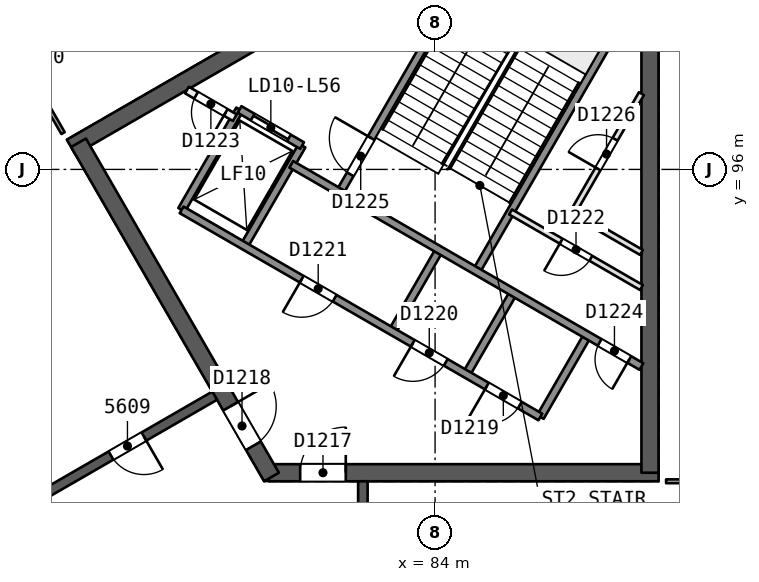
"""IFC4 building model, lengths in metres.
Left out: names, types, materials, properties, quantities, classifications, styles, units other than length and angle.
Written with IfcOpenShell. Run it as: python <this file> out.ifc"""

import sys

from ifc_helpers import new_model, si_unit, direction, frame, frame_2d, origin, place, context, subcontext, project, spatial, rectangle, extrude, element, fill, save


model = new_model("IFC4")
c1 = context("Model", 3, precision=1e-05, world=origin(), true_north=direction((0.0, 1.0)))
c2 = subcontext(c1, "Body", "Model", "MODEL_VIEW")
j1 = project(units=[si_unit("LENGTHUNIT", "METRE"), si_unit("PLANEANGLEUNIT", "RADIAN")], contexts=[c1])
p1 = place(None, origin())
s1 = spatial("IfcSite", under=j1, at=p1, CompositionType="ELEMENT")
p2 = place(p1, origin())
s2 = spatial("IfcBuilding", under=s1, at=p2, CompositionType="ELEMENT")
p3 = place(p2, frame((0.0, 0.0, 228.0)))
s3 = spatial("IfcBuildingStorey", under=s2, at=p3, CompositionType="ELEMENT", Elevation=228.0)
p4 = place(p3, frame((79.63, 88.019, 0.0), z_axis=(0.0, 0.0, 1.0), x_axis=(1.0, 0.0, 0.0)))
e1 = element("IfcWall", 1, at=p4, inside=s3, PredefinedType="SHEAR", context=c2, shape_type="SweptSolid", body=[
    extrude(rectangle(XDim=10.25, YDim=0.45, at=frame_2d((5.125, 0.0))), origin(), (0.0, 0.0, 1.0), 3.7),
])
p5 = place(p4, frame((0.82, 0.0, 0.0)))
e2 = element("IfcOpeningElement", 2, at=p5, cuts=e1, PredefinedType="OPENING", context=c2, shape_type="SweptSolid", body=[
    extrude(rectangle(XDim=1.2, YDim=2.1, at=frame_2d((0.6, 1.05))), frame((0.0, 0.235, 0.0), z_axis=(0.0, -1.0, 0.0), x_axis=(1.0, 0.0, 0.0)), (0.0, 0.0, 1.0), 0.471),
])
p6 = place(p3, frame((89.655, 88.019, 0.0), z_axis=(0.0, 0.0, 1.0), x_axis=(0.0, 1.0, 0.0)))
e3 = element("IfcWall", 3, at=p6, inside=s3, PredefinedType="SHEAR", context=c2, shape_type="SweptSolid", body=[
    extrude(rectangle(XDim=14.108, YDim=0.45, at=frame_2d((7.054, 0.0))), origin(), (0.0, 0.0, 1.0), 3.7),
])
p7 = place(p3, frame((86.723, 103.69, 0.0), z_axis=(0.0, 0.0, 1.0), x_axis=(-0.866022713978, -0.500004658852, 0.0)))
e4 = element("IfcWall", 4, at=p7, inside=s3, PredefinedType="SHEAR", context=c2, shape_type="SweptSolid", body=[
    extrude(rectangle(XDim=14.203, YDim=0.45, at=frame_2d((7.102, 0.0))), origin(), (0.0, 0.0, 1.0), 3.7),
])
p8 = place(p3, frame((74.617, 96.701, 0.0), z_axis=(0.0, 0.0, 1.0), x_axis=(0.499994385119, -0.866028645513, 0.0)))
e5 = element("IfcWall", 5, at=p8, inside=s3, PredefinedType="SHEAR", context=c2, shape_type="SweptSolid", body=[
    extrude(rectangle(XDim=10.155, YDim=0.45, at=frame_2d((5.077, 0.0))), origin(), (0.0, 0.0, 1.0), 3.7),
])
p9 = place(p8, frame((8.005, 0.0, 0.0)))
e6 = element("IfcOpeningElement", 6, at=p9, cuts=e5, PredefinedType="OPENING", context=c2, shape_type="SweptSolid", body=[
    extrude(rectangle(XDim=1.2, YDim=2.1, at=frame_2d((0.6, 1.05))), frame((0.0, 0.235, 0.0), z_axis=(0.0, -1.0, 0.0), x_axis=(1.0, 0.0, 0.0)), (0.0, 0.0, 1.0), 0.471),
])
p10 = place(p3, frame((82.1, 72.206, 0.0), z_axis=(0.0, 0.0, 1.0), x_axis=(0.0, 1.0, 0.0)))
e7 = element("IfcWall", 7, at=p10, inside=s3, PredefinedType="SHEAR", context=c2, shape_type="SweptSolid", body=[
    extrude(rectangle(XDim=15.588, YDim=0.25, at=frame_2d((7.794, 0.0))), origin(), (0.0, 0.0, 1.0), 3.3),
])
p11 = place(p10, frame((2.15, 0.0, 0.0)))
e8 = element("IfcOpeningElement", 8, at=p11, cuts=e7, PredefinedType="OPENING", context=c2, shape_type="SweptSolid", body=[
    extrude(rectangle(XDim=1.0, YDim=2.1, at=frame_2d((0.5, 1.05))), frame((0.0, 0.135, 0.0), z_axis=(0.0, -1.0, 0.0), x_axis=(1.0, 0.0, 0.0)), (0.0, 0.0, 1.0), 0.271),
])
p12 = place(p10, frame((8.75, 0.0, 0.0)))
e9 = element("IfcOpeningElement", 9, at=p12, cuts=e7, PredefinedType="OPENING", context=c2, shape_type="SweptSolid", body=[
    extrude(rectangle(XDim=1.0, YDim=2.1, at=frame_2d((0.5, 1.05))), frame((0.0, 0.135, 0.0), z_axis=(0.0, -1.0, 0.0), x_axis=(1.0, 0.0, 0.0)), (0.0, 0.0, 1.0), 0.271),
])
p13 = place(p10, frame((12.594, 0.0, 0.0)))
e10 = element("IfcOpeningElement", 10, at=p13, cuts=e7, PredefinedType="OPENING", context=c2, shape_type="SweptSolid", body=[
    extrude(rectangle(XDim=1.0, YDim=2.1, at=frame_2d((0.5, 1.05))), frame((0.0, 0.135, 0.0), z_axis=(0.0, -1.0, 0.0), x_axis=(1.0, 0.0, 0.0)), (0.0, 0.0, 1.0), 0.271),
])
p14 = place(p3, frame((78.2, 90.046, 0.0), z_axis=(0.0, 0.0, 1.0), x_axis=(-0.866026492143, -0.499998114903, 0.0)))
e11 = element("IfcWall", 11, at=p14, inside=s3, PredefinedType="SHEAR", context=c2, shape_type="SweptSolid", body=[
    extrude(rectangle(XDim=15.588, YDim=0.25, at=frame_2d((7.794, 0.0))), origin(), (0.0, 0.0, 1.0), 3.3),
])
p15 = place(p14, frame((2.15, 0.0, 0.0)))
e12 = element("IfcOpeningElement", 12, at=p15, cuts=e11, PredefinedType="OPENING", context=c2, shape_type="SweptSolid", body=[
    extrude(rectangle(XDim=1.0, YDim=2.1, at=frame_2d((0.5, 1.05))), frame((0.0, 0.135, 0.0), z_axis=(0.0, -1.0, 0.0), x_axis=(1.0, 0.0, 0.0)), (0.0, 0.0, 1.0), 0.271),
])
p16 = place(p14, frame((8.538, 0.0, 0.0)))
e13 = element("IfcOpeningElement", 13, at=p16, cuts=e11, PredefinedType="OPENING", context=c2, shape_type="SweptSolid", body=[
    extrude(rectangle(XDim=1.1, YDim=2.1, at=frame_2d((0.55, 1.05))), frame((0.0, 0.135, 0.0), z_axis=(0.0, -1.0, 0.0), x_axis=(1.0, 0.0, 0.0)), (0.0, 0.0, 1.0), 0.271),
])
p17 = place(p14, frame((12.282, 0.0, 0.0)))
e14 = element("IfcOpeningElement", 14, at=p17, cuts=e11, PredefinedType="OPENING", context=c2, shape_type="SweptSolid", body=[
    extrude(rectangle(XDim=1.0, YDim=2.1, at=frame_2d((0.5, 1.05))), frame((0.0, 0.135, 0.0), z_axis=(0.0, -1.0, 0.0), x_axis=(1.0, 0.0, 0.0)), (0.0, 0.0, 1.0), 0.271),
])
p18 = place(p3, frame((92.354, 87.794, 0.0), z_axis=(0.0, 0.0, 1.0), x_axis=(-1.0, 0.0, 0.0)))
e15 = element("IfcWall", 15, at=p18, inside=s3, PredefinedType="PARTITIONING", context=c2, shape_type="SweptSolid", body=[
    extrude(rectangle(XDim=2.274, YDim=0.1, at=frame_2d((1.137, 0.0))), origin(), (0.0, 0.0, 1.0), 3.3),
])
p19 = place(p18, frame((0.687, 0.0, 0.0)))
e16 = element("IfcOpeningElement", 16, at=p19, cuts=e15, PredefinedType="OPENING", context=c2, shape_type="SweptSolid", body=[
    extrude(rectangle(XDim=0.9, YDim=2.1, at=frame_2d((0.45, 1.05))), frame((0.0, 0.061, 0.0), z_axis=(0.0, -1.0, 0.0), x_axis=(1.0, 0.0, 0.0)), (0.0, 0.0, 1.0), 0.121),
])
p20 = place(p3, frame((74.21, 96.956, 0.0), z_axis=(0.0, 0.0, 1.0), x_axis=(-0.499948534732, 0.866055115232, 0.0)))
e17 = element("IfcWall", 17, at=p20, inside=s3, PredefinedType="PARTITIONING", context=c2, shape_type="SweptSolid", body=[
    extrude(rectangle(XDim=2.275, YDim=0.1, at=frame_2d((1.137, 0.0))), origin(), (0.0, 0.0, 1.0), 3.3),
])
p21 = place(p20, frame((0.687, 0.0, 0.0)))
e18 = element("IfcOpeningElement", 18, at=p21, cuts=e17, PredefinedType="OPENING", context=c2, shape_type="SweptSolid", body=[
    extrude(rectangle(XDim=0.9, YDim=2.1, at=frame_2d((0.45, 1.05))), frame((0.0, 0.061, 0.0), z_axis=(0.0, -1.0, 0.0), x_axis=(1.0, 0.0, 0.0)), (0.0, 0.0, 1.0), 0.121),
])
p22 = place(p3, frame((44.454, 82.574, 0.0), z_axis=(0.0, 0.0, 1.0), x_axis=(0.86602387423, 0.500002649256, 0.0)))
e19 = element("IfcWall", 19, at=p22, inside=s3, PredefinedType="SOLIDWALL", context=c2, shape_type="SweptSolid", body=[
    extrude(rectangle(XDim=50.333, YDim=0.3, at=frame_2d((25.167, 0.0))), origin(), (0.0, 0.0, 1.0), 3.3),
])
p23 = place(p22, frame((24.122, 0.0, 0.0)))
e20 = element("IfcOpeningElement", 20, at=p23, cuts=e19, PredefinedType="OPENING", context=c2, shape_type="SweptSolid", body=[
    extrude(rectangle(XDim=2.4, YDim=2.4, at=frame_2d((1.2, 1.2))), frame((0.0, 0.161, 0.0), z_axis=(0.0, -1.0, 0.0), x_axis=(1.0, 0.0, 0.0)), (0.0, 0.0, 1.0), 0.321),
])
p24 = place(p22, frame((29.111, 0.0, 0.0)))
e21 = element("IfcOpeningElement", 21, at=p24, cuts=e19, PredefinedType="OPENING", context=c2, shape_type="SweptSolid", body=[
    extrude(rectangle(XDim=2.4, YDim=2.4, at=frame_2d((1.2, 1.2))), frame((0.0, 0.161, 0.0), z_axis=(0.0, -1.0, 0.0), x_axis=(1.0, 0.0, 0.0)), (0.0, 0.0, 1.0), 0.321),
])
p25 = place(p22, frame((39.164, 0.0, 0.0)))
e22 = element("IfcOpeningElement", 22, at=p25, cuts=e19, PredefinedType="OPENING", context=c2, shape_type="SweptSolid", body=[
    extrude(rectangle(XDim=2.4, YDim=2.4, at=frame_2d((1.2, 1.2))), frame((0.0, 0.161, 0.0), z_axis=(0.0, -1.0, 0.0), x_axis=(1.0, 0.0, 0.0)), (0.0, 0.0, 1.0), 0.321),
])
p26 = place(p22, frame((18.978, 0.0, 0.0)))
e23 = element("IfcOpeningElement", 23, at=p26, cuts=e19, PredefinedType="OPENING", context=c2, shape_type="SweptSolid", body=[
    extrude(rectangle(XDim=2.4, YDim=2.4, at=frame_2d((1.2, 1.2))), frame((0.0, 0.161, 0.0), z_axis=(0.0, -1.0, 0.0), x_axis=(1.0, 0.0, 0.0)), (0.0, 0.0, 1.0), 0.321),
])
p27 = place(p22, frame((8.763, 0.0, 0.0)))
e24 = element("IfcOpeningElement", 24, at=p27, cuts=e19, PredefinedType="OPENING", context=c2, shape_type="SweptSolid", body=[
    extrude(rectangle(XDim=2.4, YDim=2.4, at=frame_2d((1.2, 1.2))), frame((0.0, 0.161, 0.0), z_axis=(0.0, -1.0, 0.0), x_axis=(1.0, 0.0, 0.0)), (0.0, 0.0, 1.0), 0.321),
])
p28 = place(p3, frame((86.77, 89.486, 0.0), z_axis=(0.0, 0.0, 1.0), x_axis=(0.499961042966, 0.86604789447, 0.0)))
e25 = element("IfcWall", 25, at=p28, inside=s3, PredefinedType="SOLIDWALL", context=c2, shape_type="SweptSolid", body=[
    extrude(rectangle(XDim=2.48, YDim=0.2, at=frame_2d((1.24, 0.0))), origin(), (0.0, 0.0, 1.0), 3.3),
])
p29 = place(p3, frame((87.621, 94.86, 0.0), z_axis=(0.0, 0.0, 1.0), x_axis=(0.499993116331, 0.866029378036, 0.0)))
e26 = element("IfcWall", 26, at=p29, inside=s3, PredefinedType="PARTITIONING", context=c2, shape_type="SweptSolid", body=[
    extrude(rectangle(XDim=3.618, YDim=0.15, at=frame_2d((1.809, 0.0))), origin(), (0.0, 0.0, 1.0), 3.3),
])
p30 = place(p29, frame((1.332, 0.0, 0.0)))
e27 = element("IfcOpeningElement", 27, at=p30, cuts=e26, PredefinedType="OPENING", context=c2, shape_type="SweptSolid", body=[
    extrude(rectangle(XDim=0.9, YDim=2.1, at=frame_2d((0.45, 1.05))), frame((0.0, 0.085, 0.0), z_axis=(0.0, -1.0, 0.0), x_axis=(1.0, 0.0, 0.0)), (0.0, 0.0, 1.0), 0.171),
])
p31 = place(p3, frame((84.821, 90.611, 0.0), z_axis=(0.0, 0.0, 1.0), x_axis=(0.499961042966, 0.86604789447, 0.0)))
e28 = element("IfcWall", 28, at=p31, inside=s3, PredefinedType="SOLIDWALL", context=c2, shape_type="SweptSolid", body=[
    extrude(rectangle(XDim=2.48, YDim=0.2, at=frame_2d((1.24, 0.0))), origin(), (0.0, 0.0, 1.0), 3.3),
])
p32 = place(p3, frame((85.087, 93.321, 0.0), z_axis=(0.0, 0.0, 1.0), x_axis=(0.500019787375, 0.866013979237, 0.0)))
e29 = element("IfcWall", 29, at=p32, inside=s3, PredefinedType="SOLIDWALL", context=c2, shape_type="SweptSolid", body=[
    extrude(rectangle(XDim=7.7, YDim=0.2, at=frame_2d((3.85, 0.0))), origin(), (0.0, 0.0, 1.0), 3.3),
])
p33 = place(p3, frame((82.873, 91.736, 0.0), z_axis=(0.0, 0.0, 1.0), x_axis=(0.499961042966, 0.86604789447, 0.0)))
e30 = element("IfcWall", 30, at=p33, inside=s3, PredefinedType="SOLIDWALL", context=c2, shape_type="SweptSolid", body=[
    extrude(rectangle(XDim=2.48, YDim=0.2, at=frame_2d((1.24, 0.0))), origin(), (0.0, 0.0, 1.0), 3.3),
])
p34 = place(p3, frame((81.493, 95.396, 0.0), z_axis=(0.0, 0.0, 1.0), x_axis=(0.500006057782, 0.866021906294, 0.0)))
e31 = element("IfcWall", 31, at=p34, inside=s3, PredefinedType="SOLIDWALL", context=c2, shape_type="SweptSolid", body=[
    extrude(rectangle(XDim=7.7, YDim=0.2, at=frame_2d((3.85, 0.0))), origin(), (0.0, 0.0, 1.0), 3.3),
])
p35 = place(p34, frame((0.55, 0.0, 0.0)))
e32 = element("IfcOpeningElement", 32, at=p35, cuts=e31, PredefinedType="OPENING", context=c2, shape_type="SweptSolid", body=[
    extrude(rectangle(XDim=1.1, YDim=2.1, at=frame_2d((0.55, 1.05))), frame((0.0, 0.11, 0.0), z_axis=(0.0, -1.0, 0.0), x_axis=(1.0, 0.0, 0.0)), (0.0, 0.0, 1.0), 0.221),
])
for number, where, z_axis, x_axis in (
    (33, (78.976, 93.986, 0.0), (0.0, 0.0, 1.0), (0.5, 0.866, 0.0)),
    (34, (77.33, 94.936, 0.0), (0.0, 0.0, 1.0), (0.5, 0.866, 0.0)),
):
    element("IfcWall", number, at=place(p3, frame(where, z_axis=z_axis, x_axis=x_axis)), inside=s3, PredefinedType="SOLIDWALL", context=c2, shape_type="SweptSolid", body=[
        extrude(rectangle(XDim=3.05, YDim=0.2, at=frame_2d((1.525, 0.0))), origin(), (0.0, 0.0, 1.0), 3.3),
    ])
p36 = place(p3, frame((86.77, 89.486, 0.0), z_axis=(0.0, 0.0, 1.0), x_axis=(-0.86601811187, 0.500012629753, 0.0)))
e35 = element("IfcWall", 35, at=p36, inside=s3, PredefinedType="SOLIDWALL", context=c2, shape_type="SweptSolid", body=[
    extrude(rectangle(XDim=10.9, YDim=0.2, at=frame_2d((5.45, 0.0))), origin(), (0.0, 0.0, 1.0), 3.3),
])
p37 = place(p36, frame((0.625, 0.0, 0.0)))
e36 = element("IfcOpeningElement", 36, at=p37, cuts=e35, PredefinedType="OPENING", context=c2, shape_type="SweptSolid", body=[
    extrude(rectangle(XDim=1.0, YDim=2.1, at=frame_2d((0.5, 1.05))), frame((0.0, 0.11, 0.0), z_axis=(0.0, -1.0, 0.0), x_axis=(1.0, 0.0, 0.0)), (0.0, 0.0, 1.0), 0.221),
])
p38 = place(p36, frame((2.875, 0.0, 0.0)))
e37 = element("IfcOpeningElement", 37, at=p38, cuts=e35, PredefinedType="OPENING", context=c2, shape_type="SweptSolid", body=[
    extrude(rectangle(XDim=1.0, YDim=2.1, at=frame_2d((0.5, 1.05))), frame((0.0, 0.11, 0.0), z_axis=(0.0, -1.0, 0.0), x_axis=(1.0, 0.0, 0.0)), (0.0, 0.0, 1.0), 0.221),
])
p39 = place(p36, frame((6.25, 0.0, 0.0)))
e38 = element("IfcOpeningElement", 38, at=p39, cuts=e35, PredefinedType="OPENING", context=c2, shape_type="SweptSolid", body=[
    extrude(rectangle(XDim=1.0, YDim=2.1, at=frame_2d((0.5, 1.05))), frame((0.0, 0.11, 0.0), z_axis=(0.0, -1.0, 0.0), x_axis=(1.0, 0.0, 0.0)), (0.0, 0.0, 1.0), 0.221),
])
p40 = place(p3, frame((89.43, 90.814, 0.0), z_axis=(0.0, 0.0, 1.0), x_axis=(-0.866018983788, 0.500011119594, 0.0)))
e39 = element("IfcWall", 39, at=p40, inside=s3, PredefinedType="SOLIDWALL", context=c2, shape_type="SweptSolid", body=[
    extrude(rectangle(XDim=10.64, YDim=0.2, at=frame_2d((5.32, 0.0))), origin(), (0.0, 0.0, 1.0), 3.3),
])
p41 = place(p40, frame((0.37, 0.0, 0.0)))
e40 = element("IfcOpeningElement", 40, at=p41, cuts=e39, PredefinedType="OPENING", context=c2, shape_type="SweptSolid", body=[
    extrude(rectangle(XDim=0.9, YDim=2.1, at=frame_2d((0.45, 1.05))), frame((0.0, 0.11, 0.0), z_axis=(0.0, -1.0, 0.0), x_axis=(1.0, 0.0, 0.0)), (0.0, 0.0, 1.0), 0.221),
])
p42 = place(p3, frame((78.73, 97.361, 0.0), z_axis=(0.0, 0.0, 1.0), x_axis=(-0.866045896294, 0.499964504253, 0.0)))
e41 = element("IfcWall", 41, at=p42, inside=s3, PredefinedType="PARTITIONING", context=c2, shape_type="SweptSolid", body=[
    extrude(rectangle(XDim=1.455, YDim=0.2, at=frame_2d((0.728, 0.0))), origin(), (0.0, 0.0, 1.0), 3.3),
])
p43 = place(p42, frame((0.278, 0.0, 0.0)))
e42 = element("IfcOpeningElement", 42, at=p43, cuts=e41, PredefinedType="OPENING", context=c2, shape_type="SweptSolid", body=[
    extrude(rectangle(XDim=0.9, YDim=2.1, at=frame_2d((0.45, 1.05))), frame((0.0, 0.11, 0.0), z_axis=(0.0, -1.0, 0.0), x_axis=(1.0, 0.0, 0.0)), (0.0, 0.0, 1.0), 0.221),
])
p44 = place(p3, frame((80.5, 96.627, 0.0), z_axis=(0.0, 0.0, 1.0), x_axis=(-0.86601224135, 0.500022797313, 0.0)))
e43 = element("IfcWall", 43, at=p44, inside=s3, PredefinedType="SOLIDWALL", context=c2, shape_type="SweptSolid", body=[
    extrude(rectangle(XDim=1.9, YDim=0.2, at=frame_2d((0.95, 0.0))), origin(), (0.0, 0.0, 1.0), 3.3),
])
p45 = place(p44, frame((0.4, 0.0, 0.0)))
e44 = element("IfcOpeningElement", 44, at=p45, cuts=e43, PredefinedType="OPENING", context=c2, shape_type="SweptSolid", body=[
    extrude(rectangle(XDim=1.1, YDim=2.1, at=frame_2d((0.55, 1.05))), frame((0.0, 0.11, 0.0), z_axis=(0.0, -1.0, 0.0), x_axis=(1.0, 0.0, 0.0)), (0.0, 0.0, 1.0), 0.221),
])
p46 = place(p3, frame((89.43, 92.892, 0.0), z_axis=(0.0, 0.0, 1.0), x_axis=(-0.866019912421, 0.500009511199, 0.0)))
e45 = element("IfcWall", 45, at=p46, inside=s3, PredefinedType="PARTITIONING", context=c2, shape_type="SweptSolid", body=[
    extrude(rectangle(XDim=3.976, YDim=0.15, at=frame_2d((1.988, 0.0))), origin(), (0.0, 0.0, 1.0), 3.3),
])
p47 = place(p46, frame((1.538, 0.0, 0.0)))
e46 = element("IfcOpeningElement", 46, at=p47, cuts=e45, PredefinedType="OPENING", context=c2, shape_type="SweptSolid", body=[
    extrude(rectangle(XDim=0.9, YDim=2.1, at=frame_2d((0.45, 1.05))), frame((0.0, 0.085, 0.0), z_axis=(0.0, -1.0, 0.0), x_axis=(1.0, 0.0, 0.0)), (0.0, 0.0, 1.0), 0.171),
])
p48 = place(p3, frame((89.43, 93.816, 0.0), z_axis=(0.0, 0.0, 1.0), x_axis=(-0.866004557827, 0.500036104519, 0.0)))
e47 = element("IfcWall", 47, at=p48, inside=s3, PredefinedType="PARTITIONING", context=c2, shape_type="SweptSolid", body=[
    extrude(rectangle(XDim=2.089, YDim=0.15, at=frame_2d((1.044, 0.0))), origin(), (0.0, 0.0, 1.0), 3.3),
])
p49 = place(p15, origin())
e48 = element("IfcDoor", 48, at=p49, inside=s3, OperationType="SINGLE_SWING_LEFT", PredefinedType="NOTDEFINED", context=c2, shape_type="SweptSolid", body=[
    extrude(rectangle(XDim=1.0, YDim=2.1, at=frame_2d((0.5, 1.05))), frame((0.0, 0.025, 0.0), z_axis=(0.0, -1.0, 0.0), x_axis=(1.0, 0.0, 0.0)), (0.0, 0.0, 1.0), 0.05),
])
fill(e12, e48)
p50 = place(p5, origin())
e49 = element("IfcDoor", 49, at=p50, inside=s3, OperationType="SINGLE_SWING_RIGHT", PredefinedType="NOTDEFINED", context=c2, shape_type="SweptSolid", body=[
    extrude(rectangle(XDim=1.2, YDim=2.1, at=frame_2d((0.6, 1.05))), frame((0.0, 0.025, 0.0), z_axis=(0.0, -1.0, 0.0), x_axis=(1.0, 0.0, 0.0)), (0.0, 0.0, 1.0), 0.05),
])
fill(e2, e49)
p51 = place(p9, origin())
e50 = element("IfcDoor", 50, at=p51, inside=s3, OperationType="SINGLE_SWING_LEFT", PredefinedType="NOTDEFINED", context=c2, shape_type="SweptSolid", body=[
    extrude(rectangle(XDim=1.2, YDim=2.1, at=frame_2d((0.6, 1.05))), frame((0.0, 0.025, 0.0), z_axis=(0.0, -1.0, 0.0), x_axis=(1.0, 0.0, 0.0)), (0.0, 0.0, 1.0), 0.05),
])
fill(e6, e50)
p52 = place(p45, origin())
e51 = element("IfcDoor", 51, at=p52, inside=s3, OperationType="SLIDING_TO_RIGHT", PredefinedType="NOTDEFINED", context=c2, shape_type="SweptSolid", body=[
    extrude(rectangle(XDim=1.1, YDim=2.1, at=frame_2d((0.55, 1.05))), frame((0.0, 0.025, 0.0), z_axis=(0.0, -1.0, 0.0), x_axis=(1.0, 0.0, 0.0)), (0.0, 0.0, 1.0), 0.05),
])
fill(e44, e51)
p53 = place(p37, origin())
e52 = element("IfcDoor", 52, at=p53, inside=s3, OperationType="SINGLE_SWING_RIGHT", PredefinedType="NOTDEFINED", context=c2, shape_type="SweptSolid", body=[
    extrude(rectangle(XDim=1.0, YDim=2.1, at=frame_2d((0.5, 1.05))), frame((0.0, 0.025, 0.0), z_axis=(0.0, -1.0, 0.0), x_axis=(1.0, 0.0, 0.0)), (0.0, 0.0, 1.0), 0.05),
])
fill(e36, e52)
p54 = place(p38, origin())
e53 = element("IfcDoor", 53, at=p54, inside=s3, OperationType="SINGLE_SWING_RIGHT", PredefinedType="NOTDEFINED", context=c2, shape_type="SweptSolid", body=[
    extrude(rectangle(XDim=1.0, YDim=2.1, at=frame_2d((0.5, 1.05))), frame((0.0, 0.025, 0.0), z_axis=(0.0, -1.0, 0.0), x_axis=(1.0, 0.0, 0.0)), (0.0, 0.0, 1.0), 0.05),
])
fill(e37, e53)
p55 = place(p39, origin())
e54 = element("IfcDoor", 54, at=p55, inside=s3, OperationType="SINGLE_SWING_RIGHT", PredefinedType="NOTDEFINED", context=c2, shape_type="SweptSolid", body=[
    extrude(rectangle(XDim=1.0, YDim=2.1, at=frame_2d((0.5, 1.05))), frame((0.0, 0.025, 0.0), z_axis=(0.0, -1.0, 0.0), x_axis=(1.0, 0.0, 0.0)), (0.0, 0.0, 1.0), 0.05),
])
fill(e38, e54)
p56 = place(p47, origin())
e55 = element("IfcDoor", 55, at=p56, inside=s3, OperationType="SINGLE_SWING_RIGHT", PredefinedType="NOTDEFINED", context=c2, shape_type="SweptSolid", body=[
    extrude(rectangle(XDim=0.9, YDim=2.1, at=frame_2d((0.45, 1.05))), frame((0.0, 0.025, 0.0), z_axis=(0.0, -1.0, 0.0), x_axis=(1.0, 0.0, 0.0)), (0.0, 0.0, 1.0), 0.05),
])
fill(e46, e55)
p57 = place(p43, origin())
e56 = element("IfcDoor", 56, at=p57, inside=s3, OperationType="SINGLE_SWING_LEFT", PredefinedType="NOTDEFINED", context=c2, shape_type="SweptSolid", body=[
    extrude(rectangle(XDim=0.9, YDim=2.1, at=frame_2d((0.45, 1.05))), frame((0.0, 0.025, 0.0), z_axis=(0.0, -1.0, 0.0), x_axis=(1.0, 0.0, 0.0)), (0.0, 0.0, 1.0), 0.05),
])
fill(e42, e56)
p58 = place(p41, origin())
e57 = element("IfcDoor", 57, at=p58, inside=s3, OperationType="SINGLE_SWING_LEFT", PredefinedType="NOTDEFINED", context=c2, shape_type="SweptSolid", body=[
    extrude(rectangle(XDim=0.9, YDim=2.1, at=frame_2d((0.45, 1.05))), frame((0.0, 0.025, 0.0), z_axis=(0.0, -1.0, 0.0), x_axis=(1.0, 0.0, 0.0)), (0.0, 0.0, 1.0), 0.05),
])
fill(e40, e57)
p59 = place(p35, origin())
e58 = element("IfcDoor", 58, at=p59, inside=s3, OperationType="SINGLE_SWING_RIGHT", PredefinedType="NOTDEFINED", context=c2, shape_type="SweptSolid", body=[
    extrude(rectangle(XDim=1.1, YDim=2.1, at=frame_2d((0.55, 1.05))), frame((0.0, 0.025, 0.0), z_axis=(0.0, -1.0, 0.0), x_axis=(1.0, 0.0, 0.0)), (0.0, 0.0, 1.0), 0.05),
])
fill(e32, e58)
p60 = place(p30, origin())
e59 = element("IfcDoor", 59, at=p60, inside=s3, OperationType="SINGLE_SWING_LEFT", PredefinedType="NOTDEFINED", context=c2, shape_type="SweptSolid", body=[
    extrude(rectangle(XDim=0.9, YDim=2.1, at=frame_2d((0.45, 1.05))), frame((0.0, 0.025, 0.0), z_axis=(0.0, -1.0, 0.0), x_axis=(1.0, 0.0, 0.0)), (0.0, 0.0, 1.0), 0.05),
])
fill(e27, e59)
save(model, sys.argv[1])
